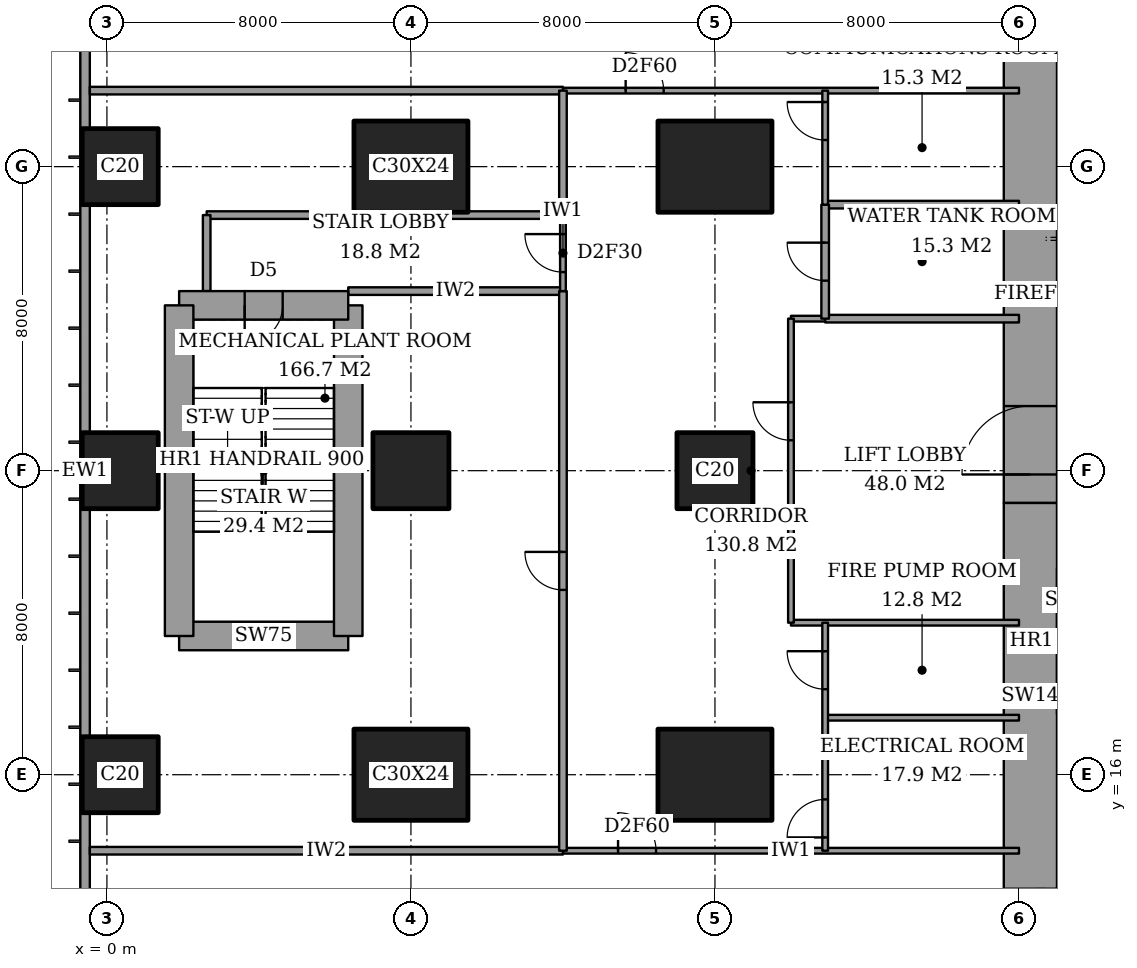
"""IFC4 building model, lengths in metres.
Left out: names, types, materials, properties, quantities, classifications, styles, units other than length and angle.
Written with IfcOpenShell. Run it as: python <this file> out.ifc"""

import sys

from ifc_helpers import new_model, si_unit, direction, frame, frame_2d, origin, origin_2d, place, context, subcontext, project, spatial, rectangle, extrude, element, fill, save


model = new_model("IFC4")
c1 = context("Model", 3, precision=1e-05, world=origin(), true_north=direction((0.0, 1.0)))
c2 = subcontext(c1, "Body", "Model", "MODEL_VIEW")
j1 = project(units=[si_unit("LENGTHUNIT", "METRE"), si_unit("PLANEANGLEUNIT", "RADIAN")], contexts=[c1])
p1 = place(None, origin())
s1 = spatial("IfcSite", under=j1, at=p1, CompositionType="ELEMENT")
p2 = place(p1, origin())
s2 = spatial("IfcBuilding", under=s1, at=p2, CompositionType="ELEMENT")
p3 = place(p2, frame((0.0, 0.0, 90.8)))
s3 = spatial("IfcBuildingStorey", under=s2, at=p3, CompositionType="ELEMENT", Elevation=90.8)
for number, where, z_axis, x_axis in (
    (1, (0.35, 16.0, 0.0), (0.0, 0.0, 1.0), (1.0, 0.0, 0.0)),
    (2, (0.35, 24.0, 0.0), (0.0, 0.0, 1.0), (1.0, 0.0, 0.0)),
    (3, (0.35, 32.0, 0.0), (0.0, 0.0, 1.0), (1.0, 0.0, 0.0)),
):
    element("IfcColumn", number, at=place(p3, frame(where, z_axis=z_axis, x_axis=x_axis)), inside=s3, PredefinedType="COLUMN", context=c2, shape_type="SweptSolid", body=[
        extrude(rectangle(XDim=2.0, YDim=2.0, at=origin_2d()), origin(), (0.0, 0.0, 1.0), 5.4),
    ])
p4 = place(p3, frame((8.0, 16.0, 0.0), z_axis=(0.0, 0.0, 1.0), x_axis=(1.0, 0.0, 0.0)))
e4 = element("IfcColumn", 4, at=p4, inside=s3, PredefinedType="COLUMN", context=c2, shape_type="SweptSolid", body=[
    extrude(rectangle(XDim=3.0, YDim=2.4, at=origin_2d()), origin(), (0.0, 0.0, 1.0), 5.4),
])
p5 = place(p3, frame((8.0, 24.0, 0.0), z_axis=(0.0, 0.0, 1.0), x_axis=(1.0, 0.0, 0.0)))
e5 = element("IfcColumn", 5, at=p5, inside=s3, PredefinedType="COLUMN", context=c2, shape_type="SweptSolid", body=[
    extrude(rectangle(XDim=2.0, YDim=2.0, at=origin_2d()), origin(), (0.0, 0.0, 1.0), 5.4),
])
for number, where, z_axis, x_axis in (
    (6, (8.0, 32.0, 0.0), (0.0, 0.0, 1.0), (1.0, 0.0, 0.0)),
    (7, (16.0, 16.0, 0.0), (0.0, 0.0, 1.0), (1.0, 0.0, 0.0)),
):
    element("IfcColumn", number, at=place(p3, frame(where, z_axis=z_axis, x_axis=x_axis)), inside=s3, PredefinedType="COLUMN", context=c2, shape_type="SweptSolid", body=[
        extrude(rectangle(XDim=3.0, YDim=2.4, at=origin_2d()), origin(), (0.0, 0.0, 1.0), 5.4),
    ])
p6 = place(p3, frame((16.0, 24.0, 0.0), z_axis=(0.0, 0.0, 1.0), x_axis=(1.0, 0.0, 0.0)))
e8 = element("IfcColumn", 8, at=p6, inside=s3, PredefinedType="COLUMN", context=c2, shape_type="SweptSolid", body=[
    extrude(rectangle(XDim=2.0, YDim=2.0, at=origin_2d()), origin(), (0.0, 0.0, 1.0), 5.4),
])
p7 = place(p3, frame((16.0, 32.0, 0.0), z_axis=(0.0, 0.0, 1.0), x_axis=(1.0, 0.0, 0.0)))
e9 = element("IfcColumn", 9, at=p7, inside=s3, PredefinedType="COLUMN", context=c2, shape_type="SweptSolid", body=[
    extrude(rectangle(XDim=3.0, YDim=2.4, at=origin_2d()), origin(), (0.0, 0.0, 1.0), 5.4),
])
p8 = place(p3, frame((24.3, 13.0, 0.0), z_axis=(0.0, 0.0, 1.0), x_axis=(0.0, 1.0, 0.0)))
e10 = element("IfcWall", 10, at=p8, inside=s3, PredefinedType="SHEAR", context=c2, shape_type="SweptSolid", body=[
    extrude(rectangle(XDim=10.15, YDim=1.4, at=frame_2d((5.075, 0.0))), origin(), (0.0, 0.0, 1.0), 5.4),
])
p9 = place(p3, frame((24.3, 23.15, 0.0), z_axis=(0.0, 0.0, 1.0), x_axis=(0.0, 1.0, 0.0)))
e11 = element("IfcWall", 11, at=p9, inside=s3, PredefinedType="SHEAR", context=c2, shape_type="SweptSolid", body=[
    extrude(rectangle(XDim=11.85, YDim=1.4, at=frame_2d((5.925, 0.0))), origin(), (0.0, 0.0, 1.0), 5.4),
])
p10 = place(p9, frame((0.75, 0.0, 0.0)))
e12 = element("IfcOpeningElement", 12, at=p10, cuts=e11, PredefinedType="OPENING", context=c2, shape_type="SweptSolid", body=[
    extrude(rectangle(XDim=1.8, YDim=2.4, at=frame_2d((0.9, 1.2))), frame((0.0, 0.71, 0.0), z_axis=(0.0, -1.0, 0.0), x_axis=(1.0, 0.0, 0.0)), (0.0, 0.0, 1.0), 1.42),
])
p11 = place(p3, frame((1.9, 19.65, 0.0), z_axis=(0.0, 0.0, 1.0), x_axis=(1.0, 0.0, 0.0)))
e13 = element("IfcWall", 13, at=p11, inside=s3, PredefinedType="SHEAR", context=c2, shape_type="SweptSolid", body=[
    extrude(rectangle(XDim=4.45, YDim=0.75, at=frame_2d((2.225, 0.0))), origin(), (0.0, 0.0, 1.0), 5.4),
])
p12 = place(p3, frame((6.35, 19.65, 0.0), z_axis=(0.0, 0.0, 1.0), x_axis=(0.0, 1.0, 0.0)))
e14 = element("IfcWall", 14, at=p12, inside=s3, PredefinedType="SHEAR", context=c2, shape_type="SweptSolid", body=[
    extrude(rectangle(XDim=8.7, YDim=0.75, at=frame_2d((4.35, 0.0))), origin(), (0.0, 0.0, 1.0), 5.4),
])
p13 = place(p3, frame((6.35, 28.35, 0.0), z_axis=(0.0, 0.0, 1.0), x_axis=(-1.0, 0.0, 0.0)))
e15 = element("IfcWall", 15, at=p13, inside=s3, PredefinedType="SHEAR", context=c2, shape_type="SweptSolid", body=[
    extrude(rectangle(XDim=4.45, YDim=0.75, at=frame_2d((2.225, 0.0))), origin(), (0.0, 0.0, 1.0), 5.4),
])
p14 = place(p13, frame((1.725, 0.0, 0.0)))
e16 = element("IfcOpeningElement", 16, at=p14, cuts=e15, PredefinedType="OPENING", context=c2, shape_type="SweptSolid", body=[
    extrude(rectangle(XDim=1.0, YDim=2.1, at=frame_2d((0.5, 1.05))), frame((0.0, 0.385, 0.0), z_axis=(0.0, -1.0, 0.0), x_axis=(1.0, 0.0, 0.0)), (0.0, 0.0, 1.0), 0.77),
])
p15 = place(p3, frame((1.9, 28.35, 0.0), z_axis=(0.0, 0.0, 1.0), x_axis=(0.0, -1.0, 0.0)))
e17 = element("IfcWall", 17, at=p15, inside=s3, PredefinedType="SHEAR", context=c2, shape_type="SweptSolid", body=[
    extrude(rectangle(XDim=8.7, YDim=0.75, at=frame_2d((4.35, 0.0))), origin(), (0.0, 0.0, 1.0), 5.4),
])
p16 = place(p3, frame((-0.575, 44.825, 0.0), z_axis=(0.0, 0.0, 1.0), x_axis=(0.0, -1.0, 0.0)))
e18 = element("IfcWall", 18, at=p16, inside=s3, PredefinedType="SOLIDWALL", context=c2, shape_type="SweptSolid", body=[
    extrude(rectangle(XDim=41.65, YDim=0.25, at=frame_2d((20.825, 0.0))), origin(), (0.0, 0.0, 1.0), 5.4),
])
p17 = place(p16, frame((0.775, 0.0, 0.9)))
e19 = element("IfcOpeningElement", 19, at=p17, cuts=e18, PredefinedType="OPENING", context=c2, shape_type="SweptSolid", body=[
    extrude(rectangle(XDim=2.4, YDim=2.4, at=frame_2d((1.2, 1.2))), frame((0.0, 0.135, 0.0), z_axis=(0.0, -1.0, 0.0), x_axis=(1.0, 0.0, 0.0)), (0.0, 0.0, 1.0), 0.27),
])
p18 = place(p16, frame((38.475, 0.0, 0.9)))
e20 = element("IfcOpeningElement", 20, at=p18, cuts=e18, PredefinedType="OPENING", context=c2, shape_type="SweptSolid", body=[
    extrude(rectangle(XDim=2.4, YDim=2.4, at=frame_2d((1.2, 1.2))), frame((0.0, 0.135, 0.0), z_axis=(0.0, -1.0, 0.0), x_axis=(1.0, 0.0, 0.0)), (0.0, 0.0, 1.0), 0.27),
])
p19 = place(p3, frame((-0.45, 14.0, 0.0), z_axis=(0.0, 0.0, 1.0), x_axis=(1.0, 0.0, 0.0)))
e21 = element("IfcWall", 21, at=p19, inside=s3, PredefinedType="PARTITIONING", context=c2, shape_type="SweptSolid", body=[
    extrude(rectangle(XDim=12.45, YDim=0.2, at=frame_2d((6.225, 0.0))), origin(), (0.0, 0.0, 1.0), 5.15),
])
p20 = place(p3, frame((12.0, 14.0, 0.0), z_axis=(0.0, 0.0, 1.0), x_axis=(1.0, 0.0, 0.0)))
e22 = element("IfcWall", 22, at=p20, inside=s3, PredefinedType="PARTITIONING", context=c2, shape_type="SweptSolid", body=[
    extrude(rectangle(XDim=12.0, YDim=0.15, at=frame_2d((6.0, 0.0))), origin(), (0.0, 0.0, 1.0), 5.15),
])
p21 = place(p20, frame((1.45, 0.0, 0.0)))
e23 = element("IfcOpeningElement", 23, at=p21, cuts=e22, PredefinedType="OPENING", context=c2, shape_type="SweptSolid", body=[
    extrude(rectangle(XDim=1.0, YDim=2.1, at=frame_2d((0.5, 1.05))), frame((0.0, 0.085, 0.0), z_axis=(0.0, -1.0, 0.0), x_axis=(1.0, 0.0, 0.0)), (0.0, 0.0, 1.0), 0.17),
])
p22 = place(p3, frame((18.9, 17.5, 0.0), z_axis=(0.0, 0.0, 1.0), x_axis=(1.0, 0.0, 0.0)))
e24 = element("IfcWall", 24, at=p22, inside=s3, PredefinedType="PARTITIONING", context=c2, shape_type="SweptSolid", body=[
    extrude(rectangle(XDim=5.1, YDim=0.15, at=frame_2d((2.55, 0.0))), origin(), (0.0, 0.0, 1.0), 5.15),
])
p23 = place(p3, frame((18.0, 20.0, 0.0), z_axis=(0.0, 0.0, 1.0), x_axis=(1.0, 0.0, 0.0)))
e25 = element("IfcWall", 25, at=p23, inside=s3, PredefinedType="PARTITIONING", context=c2, shape_type="SweptSolid", body=[
    extrude(rectangle(XDim=6.0, YDim=0.15, at=frame_2d((3.0, 0.0))), origin(), (0.0, 0.0, 1.0), 5.15),
])
p24 = place(p3, frame((18.9, 28.0, 0.0), z_axis=(0.0, 0.0, 1.0), x_axis=(1.0, 0.0, 0.0)))
e26 = element("IfcWall", 26, at=p24, inside=s3, PredefinedType="PARTITIONING", context=c2, shape_type="SweptSolid", body=[
    extrude(rectangle(XDim=5.1, YDim=0.2, at=frame_2d((2.55, 0.0))), origin(), (0.0, 0.0, 1.0), 5.15),
])
p25 = place(p3, frame((18.0, 28.0, 0.0), z_axis=(0.0, 0.0, 1.0), x_axis=(1.0, 0.0, 0.0)))
e27 = element("IfcWall", 27, at=p25, inside=s3, PredefinedType="PARTITIONING", context=c2, shape_type="SweptSolid", body=[
    extrude(rectangle(XDim=0.9, YDim=0.15, at=frame_2d((0.45, 0.0))), origin(), (0.0, 0.0, 1.0), 5.15),
])
p26 = place(p3, frame((6.35, 28.725, 0.0), z_axis=(0.0, 0.0, 1.0), x_axis=(1.0, 0.0, 0.0)))
e28 = element("IfcWall", 28, at=p26, inside=s3, PredefinedType="PARTITIONING", context=c2, shape_type="SweptSolid", body=[
    extrude(rectangle(XDim=5.65, YDim=0.2, at=frame_2d((2.825, 0.0))), origin(), (0.0, 0.0, 1.0), 5.15),
])
p27 = place(p3, frame((2.625, 30.725, 0.0), z_axis=(0.0, 0.0, 1.0), x_axis=(1.0, 0.0, 0.0)))
e29 = element("IfcWall", 29, at=p27, inside=s3, PredefinedType="PARTITIONING", context=c2, shape_type="SweptSolid", body=[
    extrude(rectangle(XDim=9.375, YDim=0.2, at=frame_2d((4.688, 0.0))), origin(), (0.0, 0.0, 1.0), 5.15),
])
p28 = place(p3, frame((18.9, 31.0, 0.0), z_axis=(0.0, 0.0, 1.0), x_axis=(1.0, 0.0, 0.0)))
e30 = element("IfcWall", 30, at=p28, inside=s3, PredefinedType="PARTITIONING", context=c2, shape_type="SweptSolid", body=[
    extrude(rectangle(XDim=5.1, YDim=0.2, at=frame_2d((2.55, 0.0))), origin(), (0.0, 0.0, 1.0), 5.15),
])
p29 = place(p3, frame((-0.45, 34.0, 0.0), z_axis=(0.0, 0.0, 1.0), x_axis=(1.0, 0.0, 0.0)))
e31 = element("IfcWall", 31, at=p29, inside=s3, PredefinedType="PARTITIONING", context=c2, shape_type="SweptSolid", body=[
    extrude(rectangle(XDim=12.45, YDim=0.2, at=frame_2d((6.225, 0.0))), origin(), (0.0, 0.0, 1.0), 5.15),
])
p30 = place(p3, frame((12.0, 34.0, 0.0), z_axis=(0.0, 0.0, 1.0), x_axis=(1.0, 0.0, 0.0)))
e32 = element("IfcWall", 32, at=p30, inside=s3, PredefinedType="PARTITIONING", context=c2, shape_type="SweptSolid", body=[
    extrude(rectangle(XDim=12.0, YDim=0.15, at=frame_2d((6.0, 0.0))), origin(), (0.0, 0.0, 1.0), 5.15),
])
p31 = place(p30, frame((1.65, 0.0, 0.0)))
e33 = element("IfcOpeningElement", 33, at=p31, cuts=e32, PredefinedType="OPENING", context=c2, shape_type="SweptSolid", body=[
    extrude(rectangle(XDim=1.0, YDim=2.1, at=frame_2d((0.5, 1.05))), frame((0.0, 0.085, 0.0), z_axis=(0.0, -1.0, 0.0), x_axis=(1.0, 0.0, 0.0)), (0.0, 0.0, 1.0), 0.17),
])
p32 = place(p3, frame((2.625, 28.725, 0.0), z_axis=(0.0, 0.0, 1.0), x_axis=(0.0, 1.0, 0.0)))
e34 = element("IfcWall", 34, at=p32, inside=s3, PredefinedType="PARTITIONING", context=c2, shape_type="SweptSolid", body=[
    extrude(rectangle(XDim=2.0, YDim=0.2, at=frame_2d((1.0, 0.0))), origin(), (0.0, 0.0, 1.0), 5.15),
])
p33 = place(p3, frame((12.0, 14.0, 0.0), z_axis=(0.0, 0.0, 1.0), x_axis=(0.0, 1.0, 0.0)))
e35 = element("IfcWall", 35, at=p33, inside=s3, PredefinedType="PARTITIONING", context=c2, shape_type="SweptSolid", body=[
    extrude(rectangle(XDim=14.725, YDim=0.2, at=frame_2d((7.363, 0.0))), origin(), (0.0, 0.0, 1.0), 5.15),
])
p34 = place(p33, frame((6.863, 0.0, 0.0)))
e36 = element("IfcOpeningElement", 36, at=p34, cuts=e35, PredefinedType="OPENING", context=c2, shape_type="SweptSolid", body=[
    extrude(rectangle(XDim=1.0, YDim=2.1, at=frame_2d((0.5, 1.05))), frame((0.0, 0.11, 0.0), z_axis=(0.0, -1.0, 0.0), x_axis=(1.0, 0.0, 0.0)), (0.0, 0.0, 1.0), 0.22),
])
p35 = place(p3, frame((12.0, 30.725, 0.0), z_axis=(0.0, 0.0, 1.0), x_axis=(0.0, 1.0, 0.0)))
e37 = element("IfcWall", 37, at=p35, inside=s3, PredefinedType="PARTITIONING", context=c2, shape_type="SweptSolid", body=[
    extrude(rectangle(XDim=3.275, YDim=0.2, at=frame_2d((1.637, 0.0))), origin(), (0.0, 0.0, 1.0), 5.15),
])
p36 = place(p3, frame((12.0, 28.725, 0.0), z_axis=(0.0, 0.0, 1.0), x_axis=(0.0, 1.0, 0.0)))
e38 = element("IfcWall", 38, at=p36, inside=s3, PredefinedType="PARTITIONING", context=c2, shape_type="SweptSolid", body=[
    extrude(rectangle(XDim=2.0, YDim=0.15, at=frame_2d((1.0, 0.0))), origin(), (0.0, 0.0, 1.0), 5.15),
])
p37 = place(p36, frame((0.5, 0.0, 0.0)))
e39 = element("IfcOpeningElement", 39, at=p37, cuts=e38, PredefinedType="OPENING", context=c2, shape_type="SweptSolid", body=[
    extrude(rectangle(XDim=1.0, YDim=2.1, at=frame_2d((0.5, 1.05))), frame((0.0, 0.085, 0.0), z_axis=(0.0, -1.0, 0.0), x_axis=(1.0, 0.0, 0.0)), (0.0, 0.0, 1.0), 0.17),
])
p38 = place(p3, frame((18.0, 20.0, 0.0), z_axis=(0.0, 0.0, 1.0), x_axis=(0.0, 1.0, 0.0)))
e40 = element("IfcWall", 40, at=p38, inside=s3, PredefinedType="PARTITIONING", context=c2, shape_type="SweptSolid", body=[
    extrude(rectangle(XDim=8.0, YDim=0.15, at=frame_2d((4.0, 0.0))), origin(), (0.0, 0.0, 1.0), 5.15),
])
p39 = place(p38, frame((4.8, 0.0, 0.0)))
e41 = element("IfcOpeningElement", 41, at=p39, cuts=e40, PredefinedType="OPENING", context=c2, shape_type="SweptSolid", body=[
    extrude(rectangle(XDim=1.0, YDim=2.1, at=frame_2d((0.5, 1.05))), frame((0.0, 0.085, 0.0), z_axis=(0.0, -1.0, 0.0), x_axis=(1.0, 0.0, 0.0)), (0.0, 0.0, 1.0), 0.17),
])
p40 = place(p3, frame((18.9, 28.0, 0.0), z_axis=(0.0, 0.0, 1.0), x_axis=(0.0, 1.0, 0.0)))
e42 = element("IfcWall", 42, at=p40, inside=s3, PredefinedType="PARTITIONING", context=c2, shape_type="SweptSolid", body=[
    extrude(rectangle(XDim=3.0, YDim=0.2, at=frame_2d((1.5, 0.0))), origin(), (0.0, 0.0, 1.0), 5.15),
])
p41 = place(p40, frame((1.0, 0.0, 0.0)))
e43 = element("IfcOpeningElement", 43, at=p41, cuts=e42, PredefinedType="OPENING", context=c2, shape_type="SweptSolid", body=[
    extrude(rectangle(XDim=1.0, YDim=2.1, at=frame_2d((0.5, 1.05))), frame((0.0, 0.11, 0.0), z_axis=(0.0, -1.0, 0.0), x_axis=(1.0, 0.0, 0.0)), (0.0, 0.0, 1.0), 0.22),
])
p42 = place(p3, frame((18.9, 14.0, 0.0), z_axis=(0.0, 0.0, 1.0), x_axis=(0.0, 1.0, 0.0)))
e44 = element("IfcWall", 44, at=p42, inside=s3, PredefinedType="PARTITIONING", context=c2, shape_type="SweptSolid", body=[
    extrude(rectangle(XDim=6.0, YDim=0.15, at=frame_2d((3.0, 0.0))), origin(), (0.0, 0.0, 1.0), 5.15),
])
p43 = place(p42, frame((0.35, 0.0, 0.0)))
e45 = element("IfcOpeningElement", 45, at=p43, cuts=e44, PredefinedType="OPENING", context=c2, shape_type="SweptSolid", body=[
    extrude(rectangle(XDim=1.0, YDim=2.1, at=frame_2d((0.5, 1.05))), frame((0.0, 0.085, 0.0), z_axis=(0.0, -1.0, 0.0), x_axis=(1.0, 0.0, 0.0)), (0.0, 0.0, 1.0), 0.17),
])
p44 = place(p42, frame((4.25, 0.0, 0.0)))
e46 = element("IfcOpeningElement", 46, at=p44, cuts=e44, PredefinedType="OPENING", context=c2, shape_type="SweptSolid", body=[
    extrude(rectangle(XDim=1.0, YDim=2.1, at=frame_2d((0.5, 1.05))), frame((0.0, 0.085, 0.0), z_axis=(0.0, -1.0, 0.0), x_axis=(1.0, 0.0, 0.0)), (0.0, 0.0, 1.0), 0.17),
])
p45 = place(p3, frame((18.9, 31.0, 0.0), z_axis=(0.0, 0.0, 1.0), x_axis=(0.0, 1.0, 0.0)))
e47 = element("IfcWall", 47, at=p45, inside=s3, PredefinedType="PARTITIONING", context=c2, shape_type="SweptSolid", body=[
    extrude(rectangle(XDim=3.0, YDim=0.15, at=frame_2d((1.5, 0.0))), origin(), (0.0, 0.0, 1.0), 5.15),
])
p46 = place(p45, frame((1.7, 0.0, 0.0)))
e48 = element("IfcOpeningElement", 48, at=p46, cuts=e47, PredefinedType="OPENING", context=c2, shape_type="SweptSolid", body=[
    extrude(rectangle(XDim=1.0, YDim=2.1, at=frame_2d((0.5, 1.05))), frame((0.0, 0.085, 0.0), z_axis=(0.0, -1.0, 0.0), x_axis=(1.0, 0.0, 0.0)), (0.0, 0.0, 1.0), 0.17),
])
p47 = place(p21, origin())
e49 = element("IfcDoor", 49, at=p47, inside=s3, OperationType="SINGLE_SWING_RIGHT", PredefinedType="DOOR", context=c2, shape_type="SweptSolid", body=[
    extrude(rectangle(XDim=1.0, YDim=2.1, at=frame_2d((0.5, 1.05))), frame((0.0, 0.025, 0.0), z_axis=(0.0, -1.0, 0.0), x_axis=(1.0, 0.0, 0.0)), (0.0, 0.0, 1.0), 0.05),
])
fill(e23, e49)
p48 = place(p34, origin())
e50 = element("IfcDoor", 50, at=p48, inside=s3, OperationType="SINGLE_SWING_LEFT", PredefinedType="DOOR", context=c2, shape_type="SweptSolid", body=[
    extrude(rectangle(XDim=1.0, YDim=2.1, at=frame_2d((0.5, 1.05))), frame((0.0, 0.025, 0.0), z_axis=(0.0, -1.0, 0.0), x_axis=(1.0, 0.0, 0.0)), (0.0, 0.0, 1.0), 0.05),
])
fill(e36, e50)
p49 = place(p31, origin())
e51 = element("IfcDoor", 51, at=p49, inside=s3, OperationType="SINGLE_SWING_RIGHT", PredefinedType="DOOR", context=c2, shape_type="SweptSolid", body=[
    extrude(rectangle(XDim=1.0, YDim=2.1, at=frame_2d((0.5, 1.05))), frame((0.0, 0.025, 0.0), z_axis=(0.0, -1.0, 0.0), x_axis=(1.0, 0.0, 0.0)), (0.0, 0.0, 1.0), 0.05),
])
fill(e33, e51)
p50 = place(p39, origin())
e52 = element("IfcDoor", 52, at=p50, inside=s3, OperationType="SINGLE_SWING_LEFT", PredefinedType="DOOR", context=c2, shape_type="SweptSolid", body=[
    extrude(rectangle(XDim=1.0, YDim=2.1, at=frame_2d((0.5, 1.05))), frame((0.0, 0.025, 0.0), z_axis=(0.0, -1.0, 0.0), x_axis=(1.0, 0.0, 0.0)), (0.0, 0.0, 1.0), 0.05),
])
fill(e41, e52)
p51 = place(p43, origin())
e53 = element("IfcDoor", 53, at=p51, inside=s3, OperationType="SINGLE_SWING_RIGHT", PredefinedType="DOOR", context=c2, shape_type="SweptSolid", body=[
    extrude(rectangle(XDim=1.0, YDim=2.1, at=frame_2d((0.5, 1.05))), frame((0.0, 0.025, 0.0), z_axis=(0.0, -1.0, 0.0), x_axis=(1.0, 0.0, 0.0)), (0.0, 0.0, 1.0), 0.05),
])
fill(e45, e53)
p52 = place(p44, origin())
e54 = element("IfcDoor", 54, at=p52, inside=s3, OperationType="SINGLE_SWING_LEFT", PredefinedType="DOOR", context=c2, shape_type="SweptSolid", body=[
    extrude(rectangle(XDim=1.0, YDim=2.1, at=frame_2d((0.5, 1.05))), frame((0.0, 0.025, 0.0), z_axis=(0.0, -1.0, 0.0), x_axis=(1.0, 0.0, 0.0)), (0.0, 0.0, 1.0), 0.05),
])
fill(e46, e54)
p53 = place(p41, origin())
e55 = element("IfcDoor", 55, at=p53, inside=s3, OperationType="SINGLE_SWING_LEFT", PredefinedType="DOOR", context=c2, shape_type="SweptSolid", body=[
    extrude(rectangle(XDim=1.0, YDim=2.1, at=frame_2d((0.5, 1.05))), frame((0.0, 0.025, 0.0), z_axis=(0.0, -1.0, 0.0), x_axis=(1.0, 0.0, 0.0)), (0.0, 0.0, 1.0), 0.05),
])
fill(e43, e55)
p54 = place(p46, origin())
e56 = element("IfcDoor", 56, at=p54, inside=s3, OperationType="SINGLE_SWING_LEFT", PredefinedType="DOOR", context=c2, shape_type="SweptSolid", body=[
    extrude(rectangle(XDim=1.0, YDim=2.1, at=frame_2d((0.5, 1.05))), frame((0.0, 0.025, 0.0), z_axis=(0.0, -1.0, 0.0), x_axis=(1.0, 0.0, 0.0)), (0.0, 0.0, 1.0), 0.05),
])
fill(e48, e56)
p55 = place(p37, origin())
e57 = element("IfcDoor", 57, at=p55, inside=s3, OperationType="SINGLE_SWING_LEFT", PredefinedType="DOOR", context=c2, shape_type="SweptSolid", body=[
    extrude(rectangle(XDim=1.0, YDim=2.1, at=frame_2d((0.5, 1.05))), frame((0.0, 0.025, 0.0), z_axis=(0.0, -1.0, 0.0), x_axis=(1.0, 0.0, 0.0)), (0.0, 0.0, 1.0), 0.05),
])
fill(e39, e57)
p56 = place(p10, origin())
e58 = element("IfcDoor", 58, at=p56, inside=s3, OperationType="DOUBLE_DOOR_DOUBLE_SWING", PredefinedType="DOOR", context=c2, shape_type="SweptSolid", body=[
    extrude(rectangle(XDim=1.8, YDim=2.4, at=frame_2d((0.9, 1.2))), frame((0.0, 0.025, 0.0), z_axis=(0.0, -1.0, 0.0), x_axis=(1.0, 0.0, 0.0)), (0.0, 0.0, 1.0), 0.05),
])
fill(e12, e58)
p57 = place(p14, origin())
e59 = element("IfcDoor", 59, at=p57, inside=s3, OperationType="SINGLE_SWING_LEFT", PredefinedType="DOOR", context=c2, shape_type="SweptSolid", body=[
    extrude(rectangle(XDim=1.0, YDim=2.1, at=frame_2d((0.5, 1.05))), frame((0.0, 0.025, 0.0), z_axis=(0.0, -1.0, 0.0), x_axis=(1.0, 0.0, 0.0)), (0.0, 0.0, 1.0), 0.05),
])
fill(e16, e59)
save(model, sys.argv[1])
